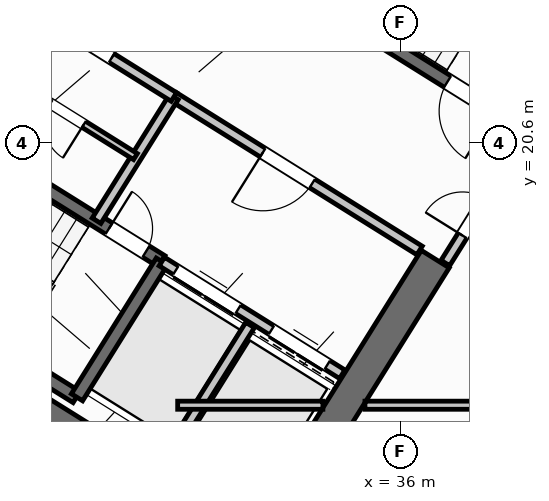
"""IFC4 building model, lengths in metres.
Left out: names, types, materials, properties, quantities, classifications, styles, units other than length and angle.
Written with IfcOpenShell. Run it as: python <this file> out.ifc"""

import sys

from ifc_helpers import new_model, si_unit, direction, frame, frame_2d, origin, place, context, subcontext, project, spatial, rectangle, extrude, source, transform, mapped, element, fill, save


model = new_model("IFC4")
c1 = context("Model", 3, precision=1e-05, world=origin(), true_north=direction((0.0, 1.0)))
c2 = subcontext(c1, "Body", "Model", "MODEL_VIEW")
j1 = project(units=[si_unit("LENGTHUNIT", "METRE"), si_unit("PLANEANGLEUNIT", "RADIAN")], contexts=[c1])
p1 = place(None, origin())
s1 = spatial("IfcSite", under=j1, at=p1, CompositionType="ELEMENT")
p2 = place(p1, origin())
s2 = spatial("IfcBuilding", under=s1, at=p2, CompositionType="ELEMENT")
p3 = place(p2, frame((0.0, 0.0, 63.6)))
s3 = spatial("IfcBuildingStorey", under=s2, at=p3, CompositionType="ELEMENT", Elevation=63.6)
p4 = place(p3, frame((33.409, 12.45, 0.0), z_axis=(0.0, 0.0, 1.0), x_axis=(-0.848051132073, 0.529914405721, 0.0)))
e1 = element("IfcWall", 1, at=p4, inside=s3, PredefinedType="SHEAR", context=c2, shape_type="SweptSolid", body=[
    extrude(rectangle(XDim=13.24, YDim=0.65, at=frame_2d((6.62, 0.0))), origin(), (0.0, 0.0, 1.0), 3.35),
])
p5 = place(p3, frame((36.683, 18.304, 0.0), z_axis=(0.0, 0.0, 1.0), x_axis=(-0.529899109053, -0.848060690178, 0.0)))
e2 = element("IfcWall", 2, at=p5, inside=s3, PredefinedType="SHEAR", context=c2, shape_type="SweptSolid", body=[
    extrude(rectangle(XDim=6.375, YDim=0.65, at=frame_2d((3.188, 0.0))), origin(), (0.0, 0.0, 1.0), 3.35),
])
p6 = place(p3, frame((29.268, 6.429, 0.0), z_axis=(0.0, 0.0, 1.0), x_axis=(-0.848049971435, 0.529916263149, 0.0)))
e3 = element("IfcWall", 3, at=p6, inside=s3, PredefinedType="STANDARD", context=c2, shape_type="SweptSolid", body=[
    extrude(rectangle(XDim=31.588, YDim=0.32, at=frame_2d((15.794, 0.0))), origin(), (0.0, 0.0, 1.0), 3.35),
])
p7 = place(p6, frame((16.362, 0.0, 0.0)))
e4 = element("IfcOpeningElement", 4, at=p7, cuts=e3, PredefinedType="OPENING", context=c2, shape_type="SweptSolid", body=[
    extrude(rectangle(XDim=1.2, YDim=2.15, at=frame_2d((0.6, 1.075))), frame((0.0, 0.17, 0.0), z_axis=(0.0, -1.0, 0.0), x_axis=(1.0, 0.0, 0.0)), (0.0, 0.0, 1.0), 0.34),
])
p8 = place(p6, frame((2.989, 0.0, 0.8)))
e5 = element("IfcOpeningElement", 5, at=p8, cuts=e3, PredefinedType="OPENING", context=c2, shape_type="SweptSolid", body=[
    extrude(rectangle(XDim=2.1, YDim=1.55, at=frame_2d((1.05, 0.775))), frame((0.0, 0.17, 0.0), z_axis=(0.0, -1.0, 0.0), x_axis=(1.0, 0.0, 0.0)), (0.0, 0.0, 1.0), 0.34),
])
p9 = place(p6, frame((8.359, 0.0, 0.8)))
e6 = element("IfcOpeningElement", 6, at=p9, cuts=e3, PredefinedType="OPENING", context=c2, shape_type="SweptSolid", body=[
    extrude(rectangle(XDim=2.1, YDim=1.55, at=frame_2d((1.05, 0.775))), frame((0.0, 0.17, 0.0), z_axis=(0.0, -1.0, 0.0), x_axis=(1.0, 0.0, 0.0)), (0.0, 0.0, 1.0), 0.34),
])
p10 = place(p6, frame((13.284, 0.0, 0.95)))
e7 = element("IfcOpeningElement", 7, at=p10, cuts=e3, PredefinedType="OPENING", context=c2, shape_type="SweptSolid", body=[
    extrude(rectangle(XDim=1.2, YDim=1.4, at=frame_2d((0.6, 0.7))), frame((0.0, 0.17, 0.0), z_axis=(0.0, -1.0, 0.0), x_axis=(1.0, 0.0, 0.0)), (0.0, 0.0, 1.0), 0.34),
])
p11 = place(p6, frame((29.188, 0.0, 0.95)))
e8 = element("IfcOpeningElement", 8, at=p11, cuts=e3, PredefinedType="OPENING", context=c2, shape_type="SweptSolid", body=[
    extrude(rectangle(XDim=1.2, YDim=1.4, at=frame_2d((0.6, 0.7))), frame((0.0, 0.17, 0.0), z_axis=(0.0, -1.0, 0.0), x_axis=(1.0, 0.0, 0.0)), (0.0, 0.0, 1.0), 0.34),
])
p12 = place(p6, frame((19.11, 0.0, 1.0)))
e9 = element("IfcOpeningElement", 9, at=p12, cuts=e3, PredefinedType="OPENING", context=c2, shape_type="SweptSolid", body=[
    extrude(rectangle(XDim=0.9, YDim=1.25, at=frame_2d((0.45, 0.625))), frame((0.0, 0.17, 0.0), z_axis=(0.0, -1.0, 0.0), x_axis=(1.0, 0.0, 0.0)), (0.0, 0.0, 1.0), 0.34),
])
p13 = place(p6, frame((21.226, 0.0, 1.0)))
e10 = element("IfcOpeningElement", 10, at=p13, cuts=e3, PredefinedType="OPENING", context=c2, shape_type="SweptSolid", body=[
    extrude(rectangle(XDim=0.9, YDim=1.25, at=frame_2d((0.45, 0.625))), frame((0.0, 0.17, 0.0), z_axis=(0.0, -1.0, 0.0), x_axis=(1.0, 0.0, 0.0)), (0.0, 0.0, 1.0), 0.34),
])
p14 = place(p6, frame((23.014, 0.0, 1.0)))
e11 = element("IfcOpeningElement", 11, at=p14, cuts=e3, PredefinedType="OPENING", context=c2, shape_type="SweptSolid", body=[
    extrude(rectangle(XDim=0.9, YDim=1.25, at=frame_2d((0.45, 0.625))), frame((0.0, 0.17, 0.0), z_axis=(0.0, -1.0, 0.0), x_axis=(1.0, 0.0, 0.0)), (0.0, 0.0, 1.0), 0.34),
])
p15 = place(p6, frame((24.802, 0.0, 1.0)))
e12 = element("IfcOpeningElement", 12, at=p15, cuts=e3, PredefinedType="OPENING", context=c2, shape_type="SweptSolid", body=[
    extrude(rectangle(XDim=0.9, YDim=1.25, at=frame_2d((0.45, 0.625))), frame((0.0, 0.17, 0.0), z_axis=(0.0, -1.0, 0.0), x_axis=(1.0, 0.0, 0.0)), (0.0, 0.0, 1.0), 0.34),
])
p16 = place(p6, frame((26.59, 0.0, 1.0)))
e13 = element("IfcOpeningElement", 13, at=p16, cuts=e3, PredefinedType="OPENING", context=c2, shape_type="SweptSolid", body=[
    extrude(rectangle(XDim=0.9, YDim=1.25, at=frame_2d((0.45, 0.625))), frame((0.0, 0.17, 0.0), z_axis=(0.0, -1.0, 0.0), x_axis=(1.0, 0.0, 0.0)), (0.0, 0.0, 1.0), 0.34),
])
p17 = place(p3, frame((29.605, 15.581, 0.0), z_axis=(0.0, 0.0, 1.0), x_axis=(-0.848036911448, 0.529937163087, 0.0)))
e14 = element("IfcWall", 14, at=p17, inside=s3, PredefinedType="SHEAR", context=c2, shape_type="SweptSolid", body=[
    extrude(rectangle(XDim=7.46, YDim=0.26, at=frame_2d((3.73, 0.0))), origin(), (0.0, 0.0, 1.0), 3.35),
])
p18 = place(p3, frame((31.28, 18.261, 0.0), z_axis=(0.0, 0.0, 1.0), x_axis=(-0.848051618787, 0.529913626805, 0.0)))
e15 = element("IfcWall", 15, at=p18, inside=s3, PredefinedType="SHEAR", context=c2, shape_type="SweptSolid", body=[
    extrude(rectangle(XDim=7.46, YDim=0.26, at=frame_2d((3.73, 0.0))), origin(), (0.0, 0.0, 1.0), 3.35),
])
p19 = place(p18, frame((0.36, 0.0, 0.0)))
e16 = element("IfcOpeningElement", 16, at=p19, cuts=e15, PredefinedType="OPENING", context=c2, shape_type="SweptSolid", body=[
    extrude(rectangle(XDim=0.86, YDim=2.05, at=frame_2d((0.43, 1.025))), frame((0.0, 0.14, 0.0), z_axis=(0.0, -1.0, 0.0), x_axis=(1.0, 0.0, 0.0)), (0.0, 0.0, 1.0), 0.28),
])
p20 = place(p3, frame((31.288, 18.256, 0.0), z_axis=(0.0, 0.0, 1.0), x_axis=(-0.529943379326, -0.848033026897, 0.0)))
e17 = element("IfcWall", 17, at=p20, inside=s3, PredefinedType="SHEAR", context=c2, shape_type="SweptSolid", body=[
    extrude(rectangle(XDim=3.16, YDim=0.26, at=frame_2d((1.58, 0.0))), origin(), (0.0, 0.0, 1.0), 3.35),
])
p21 = place(p3, frame((38.046, 21.108, 0.0), z_axis=(0.0, 0.0, 1.0), x_axis=(-0.848054434086, 0.529909121291, 0.0)))
e18 = element("IfcWall", 18, at=p21, inside=s3, PredefinedType="SHEAR", context=c2, shape_type="SweptSolid", body=[
    extrude(rectangle(XDim=7.33, YDim=0.26, at=frame_2d((3.665, 0.0))), origin(), (0.0, 0.0, 1.0), 3.35),
])
p22 = place(p21, frame((0.22, 0.0, 0.0)))
e19 = element("IfcOpeningElement", 19, at=p22, cuts=e18, PredefinedType="OPENING", context=c2, shape_type="SweptSolid", body=[
    extrude(rectangle(XDim=1.1, YDim=2.1, at=frame_2d((0.55, 1.05))), frame((0.0, 0.14, 0.0), z_axis=(0.0, -1.0, 0.0), x_axis=(1.0, 0.0, 0.0)), (0.0, 0.0, 1.0), 0.28),
])
p23 = place(p3, frame((34.848, 16.031, 0.0), z_axis=(0.0, 0.0, 1.0), x_axis=(-0.848044042236, 0.529925751807, 0.0)))
e20 = element("IfcWall", 20, at=p23, inside=s3, PredefinedType="STANDARD", context=c2, shape_type="SweptSolid", body=[
    extrude(rectangle(XDim=4.198, YDim=0.2, at=frame_2d((2.099, 0.0))), origin(), (0.0, 0.0, 1.0), 3.34),
])
p24 = place(p23, frame((0.348, 0.0, 0.0)))
e21 = element("IfcOpeningElement", 21, at=p24, cuts=e20, PredefinedType="OPENING", context=c2, shape_type="SweptSolid", body=[
    extrude(rectangle(XDim=1.3, YDim=2.2, at=frame_2d((0.65, 1.1))), frame((0.0, 0.11, 0.0), z_axis=(0.0, -1.0, 0.0), x_axis=(1.0, 0.0, 0.0)), (0.0, 0.0, 1.0), 0.22),
])
p25 = place(p23, frame((2.423, 0.0, 0.0)))
e22 = element("IfcOpeningElement", 22, at=p25, cuts=e20, PredefinedType="OPENING", context=c2, shape_type="SweptSolid", body=[
    extrude(rectangle(XDim=1.45, YDim=2.25, at=frame_2d((0.725, 1.125))), frame((0.0, 0.11, 0.0), z_axis=(0.0, -1.0, 0.0), x_axis=(1.0, 0.0, 0.0)), (0.0, 0.0, 1.0), 0.22),
])
p26 = place(p3, frame((36.374, 18.474, 0.0), z_axis=(0.0, 0.0, 1.0), x_axis=(-0.848051071577, 0.529914502535, 0.0)))
e23 = element("IfcWall", 23, at=p26, inside=s3, PredefinedType="STANDARD", context=c2, shape_type="SweptSolid", body=[
    extrude(rectangle(XDim=5.718, YDim=0.2, at=frame_2d((2.859, 0.0))), origin(), (0.0, 0.0, 1.0), 3.34),
])
p27 = place(p26, frame((2.498, 0.0, 0.0)))
e24 = element("IfcOpeningElement", 24, at=p27, cuts=e23, PredefinedType="OPENING", context=c2, shape_type="SweptSolid", body=[
    extrude(rectangle(XDim=1.15, YDim=2.1, at=frame_2d((0.575, 1.05))), frame((0.0, 0.11, 0.0), z_axis=(0.0, -1.0, 0.0), x_axis=(1.0, 0.0, 0.0)), (0.0, 0.0, 1.0), 0.22),
])
p28 = place(p3, frame((33.029, 17.003, 0.0), z_axis=(0.0, 0.0, 1.0), x_axis=(-0.529916267533, -0.848049968695, 0.0)))
e25 = element("IfcWall", 25, at=p28, inside=s3, PredefinedType="STANDARD", context=c2, shape_type="SweptSolid", body=[
    extrude(rectangle(XDim=2.92, YDim=0.2, at=frame_2d((1.46, 0.0))), origin(), (0.0, 0.0, 1.0), 3.34),
])
p29 = place(p3, frame((31.525, 21.504, 0.0), z_axis=(0.0, 0.0, 1.0), x_axis=(-0.529907497854, -0.848055448493, 0.0)))
e26 = element("IfcWall", 26, at=p29, inside=s3, PredefinedType="STANDARD", context=c2, shape_type="SweptSolid", body=[
    extrude(rectangle(XDim=2.88, YDim=0.2, at=frame_2d((1.44, 0.0))), origin(), (0.0, 0.0, 1.0), 3.34),
])
p30 = place(p3, frame((31.525, 21.504, 0.0), z_axis=(0.0, 0.0, 1.0), x_axis=(-0.848044998614, 0.529924221305, 0.0)))
e27 = element("IfcWall", 27, at=p30, inside=s3, PredefinedType="STANDARD", context=c2, shape_type="SweptSolid", body=[
    extrude(rectangle(XDim=6.168, YDim=0.2, at=frame_2d((3.084, 0.0))), origin(), (0.0, 0.0, 1.0), 3.34),
])
p31 = place(p30, frame((4.4, 0.0, 0.0)))
e28 = element("IfcOpeningElement", 28, at=p31, cuts=e27, PredefinedType="OPENING", context=c2, shape_type="SweptSolid", body=[
    extrude(rectangle(XDim=0.86, YDim=2.05, at=frame_2d((0.43, 1.025))), frame((0.0, 0.11, 0.0), z_axis=(0.0, -1.0, 0.0), x_axis=(1.0, 0.0, 0.0)), (0.0, 0.0, 1.0), 0.22),
])
p32 = place(p30, frame((1.45, 0.0, 0.0)))
e29 = element("IfcOpeningElement", 29, at=p32, cuts=e27, PredefinedType="OPENING", context=c2, shape_type="SweptSolid", body=[
    extrude(rectangle(XDim=0.86, YDim=2.05, at=frame_2d((0.43, 1.025))), frame((0.0, 0.11, 0.0), z_axis=(0.0, -1.0, 0.0), x_axis=(1.0, 0.0, 0.0)), (0.0, 0.0, 1.0), 0.22),
])
p33 = place(p3, frame((30.766, 20.327, 0.0), z_axis=(0.0, 0.0, 1.0), x_axis=(-0.848052663127, 0.529911955482, 0.0)))
e30 = element("IfcWall", 30, at=p33, inside=s3, PredefinedType="PLUMBINGWALL", context=c2, shape_type="SweptSolid", body=[
    extrude(rectangle(XDim=3.28, YDim=0.14, at=frame_2d((1.64, 0.0))), origin(), (0.0, 0.0, 1.0), 3.34),
])
p34 = place(p33, frame((1.2, 0.0, 0.0)))
e31 = element("IfcOpeningElement", 31, at=p34, cuts=e30, PredefinedType="OPENING", context=c2, shape_type="SweptSolid", body=[
    extrude(rectangle(XDim=0.78, YDim=2.05, at=frame_2d((0.39, 1.025))), frame((0.0, 0.08, 0.0), z_axis=(0.0, -1.0, 0.0), x_axis=(1.0, 0.0, 0.0)), (0.0, 0.0, 1.0), 0.16),
])
p35 = place(p3, frame((32.164, 10.374, 0.0), z_axis=(0.0, 0.0, 1.0), x_axis=(-0.848044107957, 0.529925646633, 0.0)))
e32 = element("IfcWall", 32, at=p35, inside=s3, PredefinedType="PARTITIONING", context=c2, shape_type="SweptSolid", body=[
    extrude(rectangle(XDim=15.57, YDim=0.16, at=frame_2d((7.785, 0.0))), origin(), (0.0, 0.0, 1.0), 3.34),
])
p36 = place(p35, frame((10.83, 0.0, 0.0)))
e33 = element("IfcOpeningElement", 33, at=p36, cuts=e32, PredefinedType="OPENING", context=c2, shape_type="SweptSolid", body=[
    extrude(rectangle(XDim=1.0, YDim=2.1, at=frame_2d((0.5, 1.05))), frame((0.0, 0.09, 0.0), z_axis=(0.0, -1.0, 0.0), x_axis=(1.0, 0.0, 0.0)), (0.0, 0.0, 1.0), 0.18),
])
p37 = place(p3, frame((29.72, 8.859, 0.0), z_axis=(0.0, 0.0, 1.0), x_axis=(-0.848049134363, 0.529917602752, 0.0)))
e34 = element("IfcWall", 34, at=p37, inside=s3, PredefinedType="PLUMBINGWALL", context=c2, shape_type="SweptSolid", body=[
    extrude(rectangle(XDim=14.3, YDim=0.14, at=frame_2d((7.15, 0.0))), origin(), (0.0, 0.0, 1.0), 3.34),
])
p38 = place(p37, frame((9.57, 0.0, 0.0)))
e35 = element("IfcOpeningElement", 35, at=p38, cuts=e34, PredefinedType="OPENING", context=c2, shape_type="SweptSolid", body=[
    extrude(rectangle(XDim=0.92, YDim=2.08, at=frame_2d((0.46, 1.04))), frame((0.0, 0.08, 0.0), z_axis=(0.0, -1.0, 0.0), x_axis=(1.0, 0.0, 0.0)), (0.0, 0.0, 1.0), 0.16),
])
p39 = place(p3, frame((38.451, 20.737, 0.0), z_axis=(0.0, 0.0, 1.0), x_axis=(-0.529924799939, -0.848044637038, 0.0)))
e36 = element("IfcWall", 36, at=p39, inside=s3, PredefinedType="STANDARD", context=c2, shape_type="SweptSolid", body=[
    extrude(rectangle(XDim=2.96, YDim=0.2, at=frame_2d((1.48, 0.0))), origin(), (0.0, 0.0, 1.0), 3.34),
])
p40 = place(p39, frame((1.46, 0.0, 0.0)))
e37 = element("IfcOpeningElement", 37, at=p40, cuts=e36, PredefinedType="OPENING", context=c2, shape_type="SweptSolid", body=[
    extrude(rectangle(XDim=0.86, YDim=2.05, at=frame_2d((0.43, 1.025))), frame((0.0, 0.11, 0.0), z_axis=(0.0, -1.0, 0.0), x_axis=(1.0, 0.0, 0.0)), (0.0, 0.0, 1.0), 0.22),
])
p41 = place(p3, frame((31.6, 15.42, 0.0), z_axis=(0.0, 0.0, 1.0), x_axis=(1.0, 0.0, 0.0)))
e38 = element("IfcWall", 38, at=p41, inside=s3, PredefinedType="PARTITIONING", context=c2, shape_type="SweptSolid", body=[
    extrude(rectangle(XDim=2.866, YDim=0.16, at=frame_2d((1.433, 0.0))), origin(), (0.0, 0.0, 1.0), 3.34),
])
p42 = place(p3, frame((35.296, 15.42, 0.0), z_axis=(0.0, 0.0, 1.0), x_axis=(1.0, 0.0, 0.0)))
e39 = element("IfcWall", 39, at=p42, inside=s3, PredefinedType="PARTITIONING", context=c2, shape_type="SweptSolid", body=[
    extrude(rectangle(XDim=15.311, YDim=0.16, at=frame_2d((7.655, 0.0))), origin(), (0.0, 0.0, 1.0), 3.34),
])
p43 = place(p42, frame((3.176, 0.0, 0.0)))
e40 = element("IfcOpeningElement", 40, at=p43, cuts=e39, PredefinedType="OPENING", context=c2, shape_type="SweptSolid", body=[
    extrude(rectangle(XDim=1.0, YDim=2.1, at=frame_2d((0.5, 1.05))), frame((0.0, 0.09, 0.0), z_axis=(0.0, -1.0, 0.0), x_axis=(1.0, 0.0, 0.0)), (0.0, 0.0, 1.0), 0.18),
])
m1 = source(origin(), c2, "Body", "SweptSolid", [
    extrude(rectangle(XDim=0.86, YDim=2.05, at=frame_2d((0.43, 1.025))), frame((0.0, 0.025, 0.0), z_axis=(0.0, -1.0, 0.0), x_axis=(1.0, 0.0, 0.0)), (0.0, 0.0, 1.0), 0.05),
])
p44 = place(p19, frame((0.86, 0.0, 0.0), z_axis=(0.0, 0.0, 1.0), x_axis=(-1.0, 0.0, 0.0)))
e41 = element("IfcDoor", 41, at=p44, inside=s3, OperationType="SINGLE_SWING_LEFT", PredefinedType="DOOR", context=c2, shape_type="MappedRepresentation", body=[
    mapped(m1, transform((0.0, 0.0, 0.0), scale=1.0)),
])
fill(e16, e41)
m2 = source(origin(), c2, "Body", "SweptSolid", [
    extrude(rectangle(XDim=1.1, YDim=2.1, at=frame_2d((0.55, 1.05))), frame((0.0, 0.025, 0.0), z_axis=(0.0, -1.0, 0.0), x_axis=(1.0, 0.0, 0.0)), (0.0, 0.0, 1.0), 0.05),
])
p45 = place(p22, origin())
e42 = element("IfcDoor", 42, at=p45, inside=s3, OperationType="SINGLE_SWING_LEFT", PredefinedType="DOOR", context=c2, shape_type="MappedRepresentation", body=[
    mapped(m2, transform((0.0, 0.0, 0.0), scale=1.0)),
])
fill(e19, e42)
m3 = source(origin(), c2, "Body", "SweptSolid", [
    extrude(rectangle(XDim=1.15, YDim=2.1, at=frame_2d((0.575, 1.05))), frame((0.0, 0.025, 0.0), z_axis=(0.0, -1.0, 0.0), x_axis=(1.0, 0.0, 0.0)), (0.0, 0.0, 1.0), 0.05),
])
p46 = place(p27, origin())
e43 = element("IfcDoor", 43, at=p46, inside=s3, OperationType="SINGLE_SWING_RIGHT", PredefinedType="DOOR", context=c2, shape_type="MappedRepresentation", body=[
    mapped(m3, transform((0.0, 0.0, 0.0), scale=1.0)),
])
fill(e24, e43)
m4 = source(origin(), c2, "Body", "SweptSolid", [
    extrude(rectangle(XDim=1.3, YDim=2.2, at=frame_2d((0.65, 1.1))), frame((0.0, 0.025, 0.0), z_axis=(0.0, -1.0, 0.0), x_axis=(1.0, 0.0, 0.0)), (0.0, 0.0, 1.0), 0.05),
])
p47 = place(p24, origin())
e44 = element("IfcDoor", 44, at=p47, inside=s3, OperationType="DOUBLE_DOOR_SLIDING", PredefinedType="DOOR", context=c2, shape_type="MappedRepresentation", body=[
    mapped(m4, transform((0.0, 0.0, 0.0), scale=1.0)),
])
fill(e21, e44)
m5 = source(origin(), c2, "Body", "SweptSolid", [
    extrude(rectangle(XDim=1.45, YDim=2.25, at=frame_2d((0.725, 1.125))), frame((0.0, 0.025, 0.0), z_axis=(0.0, -1.0, 0.0), x_axis=(1.0, 0.0, 0.0)), (0.0, 0.0, 1.0), 0.05),
])
p48 = place(p25, origin())
e45 = element("IfcDoor", 45, at=p48, inside=s3, OperationType="DOUBLE_DOOR_SLIDING", PredefinedType="DOOR", context=c2, shape_type="MappedRepresentation", body=[
    mapped(m5, transform((0.0, 0.0, 0.0), scale=1.0)),
])
fill(e22, e45)
p49 = place(p32, frame((0.86, 0.0, 0.0), z_axis=(0.0, 0.0, 1.0), x_axis=(-1.0, 0.0, 0.0)))
e46 = element("IfcDoor", 46, at=p49, inside=s3, OperationType="SINGLE_SWING_RIGHT", PredefinedType="DOOR", context=c2, shape_type="MappedRepresentation", body=[
    mapped(m1, transform((0.0, 0.0, 0.0), scale=1.0)),
])
fill(e29, e46)
m6 = source(origin(), c2, "Body", "SweptSolid", [
    extrude(rectangle(XDim=0.78, YDim=2.05, at=frame_2d((0.39, 1.025))), frame((0.0, 0.025, 0.0), z_axis=(0.0, -1.0, 0.0), x_axis=(1.0, 0.0, 0.0)), (0.0, 0.0, 1.0), 0.05),
])
p50 = place(p34, origin())
e47 = element("IfcDoor", 47, at=p50, inside=s3, OperationType="SINGLE_SWING_LEFT", PredefinedType="DOOR", context=c2, shape_type="MappedRepresentation", body=[
    mapped(m6, transform((0.0, 0.0, 0.0), scale=1.0)),
])
fill(e31, e47)
p51 = place(p40, frame((0.86, 0.0, 0.0), z_axis=(0.0, 0.0, 1.0), x_axis=(-1.0, 0.0, 0.0)))
e48 = element("IfcDoor", 48, at=p51, inside=s3, OperationType="SINGLE_SWING_LEFT", PredefinedType="DOOR", context=c2, shape_type="MappedRepresentation", body=[
    mapped(m1, transform((0.0, 0.0, 0.0), scale=1.0)),
])
fill(e37, e48)
save(model, sys.argv[1])
